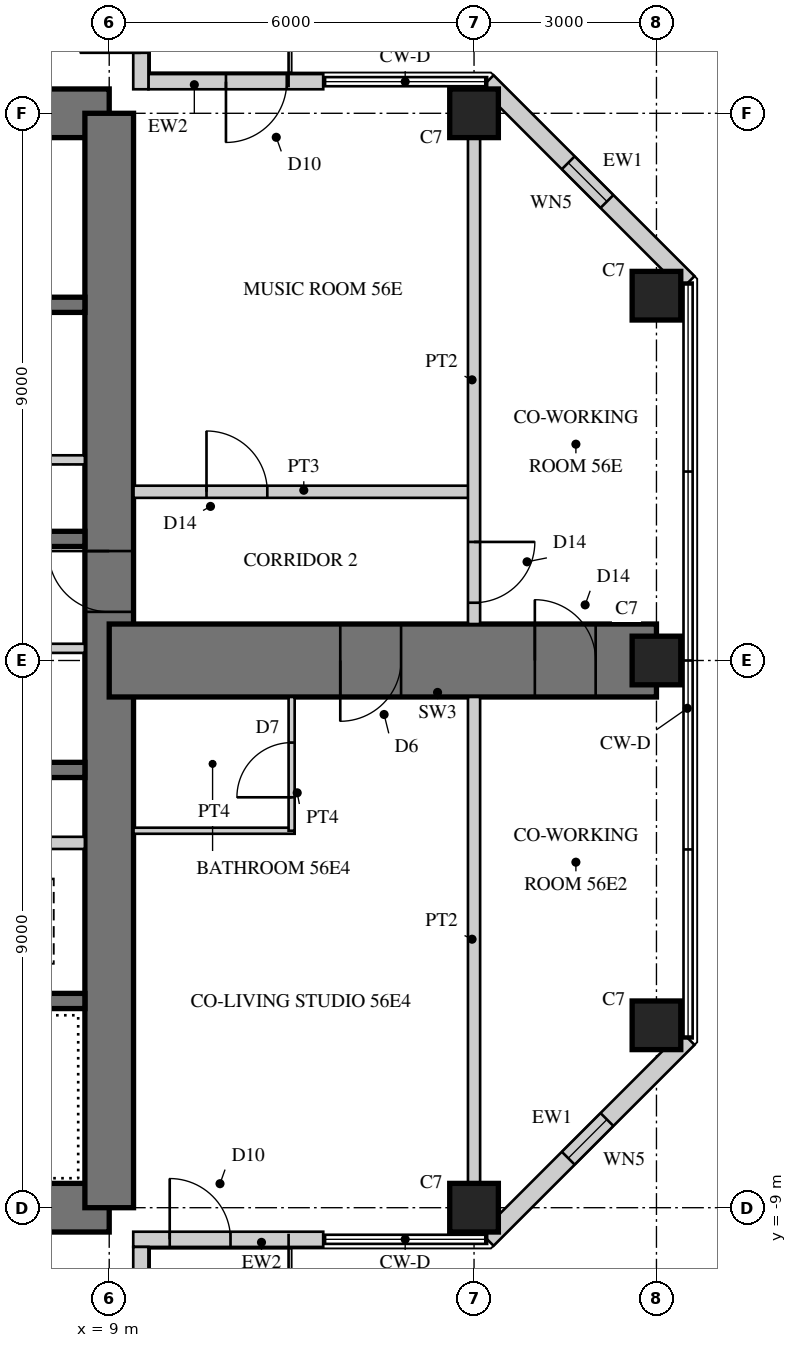
"""IFC4 building model, lengths in metres.
Left out: names, types, materials, properties, quantities, classifications, styles, units other than length and angle.
Written with IfcOpenShell. Run it as: python <this file> out.ifc"""

import sys

from ifc_helpers import new_model, si_unit, direction, frame, frame_2d, origin, origin_2d, place, context, subcontext, project, spatial, rectangle, hollow_rectangle, extrude, element, fill, save


model = new_model("IFC4")
c1 = context("Model", 3, precision=1e-05, world=origin(), true_north=direction((0.0, 1.0)))
c2 = subcontext(c1, "Body", "Model", "MODEL_VIEW")
j1 = project(units=[si_unit("LENGTHUNIT", "METRE"), si_unit("PLANEANGLEUNIT", "RADIAN")], contexts=[c1])
p1 = place(None, origin())
s1 = spatial("IfcSite", under=j1, at=p1, CompositionType="ELEMENT")
p2 = place(p1, origin())
s2 = spatial("IfcBuilding", under=s1, at=p2, CompositionType="ELEMENT")
p3 = place(p2, frame((0.0, 0.0, 222.1)))
s3 = spatial("IfcBuildingStorey", under=s2, at=p3, CompositionType="ELEMENT", Elevation=222.1)
p4 = place(p3, frame((9.0, 9.0, 0.0), z_axis=(0.0, 0.0, 1.0), x_axis=(-1.0, 0.0, 0.0)))
e1 = element("IfcWall", 1, at=p4, inside=s3, PredefinedType="SHEAR", context=c2, shape_type="SweptSolid", body=[
    extrude(rectangle(XDim=18.0, YDim=0.8, at=frame_2d((9.0, 0.0))), origin(), (0.0, 0.0, 1.0), 3.4),
])
p5 = place(p4, frame((9.8, 0.0, 0.0)))
e2 = element("IfcOpeningElement", 2, at=p5, cuts=e1, PredefinedType="OPENING", context=c2, shape_type="SweptSolid", body=[
    extrude(rectangle(XDim=1.0, YDim=2.4, at=frame_2d((0.5, 1.2))), frame((0.0, 0.41, 0.0), z_axis=(0.0, -1.0, 0.0), x_axis=(1.0, 0.0, 0.0)), (0.0, 0.0, 1.0), 0.82),
])
p6 = place(p3, frame((-9.0, -9.0, 0.0), z_axis=(0.0, 0.0, 1.0), x_axis=(1.0, 0.0, 0.0)))
e3 = element("IfcWall", 3, at=p6, inside=s3, PredefinedType="SHEAR", context=c2, shape_type="SweptSolid", body=[
    extrude(rectangle(XDim=18.0, YDim=0.8, at=frame_2d((9.0, 0.0))), origin(), (0.0, 0.0, 1.0), 3.4),
])
p7 = place(p6, frame((9.8, 0.0, 0.0)))
e4 = element("IfcOpeningElement", 4, at=p7, cuts=e3, PredefinedType="OPENING", context=c2, shape_type="SweptSolid", body=[
    extrude(rectangle(XDim=1.0, YDim=2.4, at=frame_2d((0.5, 1.2))), frame((0.0, 0.41, 0.0), z_axis=(0.0, -1.0, 0.0), x_axis=(1.0, 0.0, 0.0)), (0.0, 0.0, 1.0), 0.82),
])
p8 = place(p3, frame((9.0, -9.0, 0.0), z_axis=(0.0, 0.0, 1.0), x_axis=(0.0, 1.0, 0.0)))
e5 = element("IfcWall", 5, at=p8, inside=s3, PredefinedType="SHEAR", context=c2, shape_type="SweptSolid", body=[
    extrude(rectangle(XDim=18.0, YDim=0.8, at=frame_2d((9.0, 0.0))), origin(), (0.0, 0.0, 1.0), 3.4),
])
p9 = place(p8, frame((9.8, 0.0, 0.0)))
e6 = element("IfcOpeningElement", 6, at=p9, cuts=e5, PredefinedType="OPENING", context=c2, shape_type="SweptSolid", body=[
    extrude(rectangle(XDim=1.0, YDim=2.4, at=frame_2d((0.5, 1.2))), frame((0.0, 0.41, 0.0), z_axis=(0.0, -1.0, 0.0), x_axis=(1.0, 0.0, 0.0)), (0.0, 0.0, 1.0), 0.82),
])
p10 = place(p3, frame((1.925, 2.0, 0.0), z_axis=(0.0, 0.0, 1.0), x_axis=(1.0, 0.0, 0.0)))
e7 = element("IfcWall", 7, at=p10, inside=s3, PredefinedType="SHEAR", context=c2, shape_type="SweptSolid", body=[
    extrude(rectangle(XDim=6.675, YDim=0.25, at=frame_2d((3.337, 0.0))), origin(), (0.0, 0.0, 1.0), 3.4),
])
p11 = place(p3, frame((1.925, 5.85, 0.0), z_axis=(0.0, 0.0, 1.0), x_axis=(1.0, 0.0, 0.0)))
e8 = element("IfcWall", 8, at=p11, inside=s3, PredefinedType="SHEAR", context=c2, shape_type="SweptSolid", body=[
    extrude(rectangle(XDim=6.675, YDim=0.25, at=frame_2d((3.337, 0.0))), origin(), (0.0, 0.0, 1.0), 3.4),
])
p12 = place(p11, frame((0.546, 0.0, 0.0)))
e9 = element("IfcOpeningElement", 9, at=p12, cuts=e8, PredefinedType="OPENING", context=c2, shape_type="SweptSolid", body=[
    extrude(rectangle(XDim=1.0, YDim=2.1, at=frame_2d((0.5, 1.05))), frame((0.0, 0.135, 0.0), z_axis=(0.0, -1.0, 0.0), x_axis=(1.0, 0.0, 0.0)), (0.0, 0.0, 1.0), 0.27),
])
p13 = place(p11, frame((2.837, 0.0, 0.0)))
e10 = element("IfcOpeningElement", 10, at=p13, cuts=e8, PredefinedType="OPENING", context=c2, shape_type="SweptSolid", body=[
    extrude(rectangle(XDim=1.0, YDim=2.1, at=frame_2d((0.5, 1.05))), frame((0.0, 0.135, 0.0), z_axis=(0.0, -1.0, 0.0), x_axis=(1.0, 0.0, 0.0)), (0.0, 0.0, 1.0), 0.27),
])
p14 = place(p3, frame((1.925, 3.3, 0.0), z_axis=(0.0, 0.0, 1.0), x_axis=(1.0, 0.0, 0.0)))
e11 = element("IfcWall", 11, at=p14, inside=s3, PredefinedType="PARTITIONING", context=c2, shape_type="SweptSolid", body=[
    extrude(rectangle(XDim=6.675, YDim=0.15, at=frame_2d((3.337, 0.0))), origin(), (0.0, 0.0, 1.0), 3.4),
])
p15 = place(p14, frame((0.075, 0.0, 0.0)))
e12 = element("IfcOpeningElement", 12, at=p15, cuts=e11, PredefinedType="OPENING", context=c2, shape_type="SweptSolid", body=[
    extrude(rectangle(XDim=0.8, YDim=2.1, at=frame_2d((0.4, 1.05))), frame((0.0, 0.085, 0.0), z_axis=(0.0, -1.0, 0.0), x_axis=(1.0, 0.0, 0.0)), (0.0, 0.0, 1.0), 0.17),
])
p16 = place(p14, frame((3.675, 0.0, 0.0)))
e13 = element("IfcOpeningElement", 13, at=p16, cuts=e11, PredefinedType="OPENING", context=c2, shape_type="SweptSolid", body=[
    extrude(rectangle(XDim=0.8, YDim=2.1, at=frame_2d((0.4, 1.05))), frame((0.0, 0.085, 0.0), z_axis=(0.0, -1.0, 0.0), x_axis=(1.0, 0.0, 0.0)), (0.0, 0.0, 1.0), 0.17),
])
p17 = place(p3, frame((2.125, -1.8, 0.0), z_axis=(0.0, 0.0, 1.0), x_axis=(1.0, 0.0, 0.0)))
e14 = element("IfcWall", 14, at=p17, inside=s3, PredefinedType="SHEAR", context=c2, shape_type="SweptSolid", body=[
    extrude(rectangle(XDim=6.475, YDim=0.25, at=frame_2d((3.238, 0.0))), origin(), (0.0, 0.0, 1.0), 3.4),
])
p18 = place(p3, frame((2.125, -5.6, 0.0), z_axis=(0.0, 0.0, 1.0), x_axis=(1.0, 0.0, 0.0)))
e15 = element("IfcWall", 15, at=p18, inside=s3, PredefinedType="SHEAR", context=c2, shape_type="SweptSolid", body=[
    extrude(rectangle(XDim=6.475, YDim=0.25, at=frame_2d((3.238, 0.0))), origin(), (0.0, 0.0, 1.0), 3.4),
])
p19 = place(p18, frame((0.175, 0.0, 0.0)))
e16 = element("IfcOpeningElement", 16, at=p19, cuts=e15, PredefinedType="OPENING", context=c2, shape_type="SweptSolid", body=[
    extrude(rectangle(XDim=1.0, YDim=2.1, at=frame_2d((0.5, 1.05))), frame((0.0, 0.135, 0.0), z_axis=(0.0, -1.0, 0.0), x_axis=(1.0, 0.0, 0.0)), (0.0, 0.0, 1.0), 0.27),
])
p20 = place(p3, frame((5.725, -3.0, 0.0), z_axis=(0.0, 0.0, 1.0), x_axis=(1.0, 0.0, 0.0)))
e17 = element("IfcWall", 17, at=p20, inside=s3, PredefinedType="PARTITIONING", context=c2, shape_type="SweptSolid", body=[
    extrude(rectangle(XDim=2.875, YDim=0.2, at=frame_2d((1.438, 0.0))), origin(), (0.0, 0.0, 1.0), 3.4),
])
p21 = place(p3, frame((9.0, 0.0, 0.0), z_axis=(0.0, 0.0, 1.0), x_axis=(1.0, 0.0, 0.0)))
e18 = element("IfcWall", 18, at=p21, inside=s3, PredefinedType="SHEAR", context=c2, shape_type="SweptSolid", body=[
    extrude(rectangle(XDim=9.0, YDim=1.2, at=frame_2d((4.5, 0.0))), origin(), (0.0, 0.0, 1.0), 3.4),
])
p22 = place(p21, frame((3.8, 0.0, 0.0)))
e19 = element("IfcOpeningElement", 19, at=p22, cuts=e18, PredefinedType="OPENING", context=c2, shape_type="SweptSolid", body=[
    extrude(rectangle(XDim=1.0, YDim=2.15, at=frame_2d((0.5, 1.075))), frame((0.0, 0.61, 0.0), z_axis=(0.0, -1.0, 0.0), x_axis=(1.0, 0.0, 0.0)), (0.0, 0.0, 1.0), 1.22),
])
p23 = place(p21, frame((7.0, 0.0, 0.0)))
e20 = element("IfcOpeningElement", 20, at=p23, cuts=e18, PredefinedType="OPENING", context=c2, shape_type="SweptSolid", body=[
    extrude(rectangle(XDim=1.0, YDim=2.2, at=frame_2d((0.5, 1.1))), frame((0.0, 0.61, 0.0), z_axis=(0.0, -1.0, 0.0), x_axis=(1.0, 0.0, 0.0)), (0.0, 0.0, 1.0), 1.22),
])
for number, where, z_axis, x_axis in (
    (21, (15.0, -9.0, 0.0), (0.0, 0.0, 1.0), (1.0, 0.0, 0.0)),
    (22, (15.0, 9.0, 0.0), (0.0, 0.0, 1.0), (1.0, 0.0, 0.0)),
    (23, (18.0, -6.0, 0.0), (0.0, 0.0, 1.0), (1.0, 0.0, 0.0)),
    (24, (18.0, 0.0, 0.0), (0.0, 0.0, 1.0), (1.0, 0.0, 0.0)),
    (25, (18.0, 6.0, 0.0), (0.0, 0.0, 1.0), (1.0, 0.0, 0.0)),
):
    element("IfcColumn", number, at=place(p3, frame(where, z_axis=z_axis, x_axis=x_axis)), inside=s3, PredefinedType="COLUMN", context=c2, shape_type="SweptSolid", body=[
        extrude(rectangle(XDim=0.8, YDim=0.8, at=origin_2d()), origin(), (0.0, 0.0, 1.0), 3.4),
    ])
p24 = place(p3, frame((9.395, -9.52, 0.0), z_axis=(0.0, 0.0, 1.0), x_axis=(1.0, 0.0, 0.0)))
e26 = element("IfcWall", 26, at=p24, inside=s3, PredefinedType="SOLIDWALL", context=c2, shape_type="SweptSolid", body=[
    extrude(rectangle(XDim=3.125, YDim=0.25, at=frame_2d((1.562, 0.0))), origin(), (0.0, 0.0, 1.0), 3.22),
])
p25 = place(p24, frame((0.6, 0.0, 0.0)))
e27 = element("IfcOpeningElement", 27, at=p25, cuts=e26, PredefinedType="OPENING", context=c2, shape_type="SweptSolid", body=[
    extrude(rectangle(XDim=1.0, YDim=2.2, at=frame_2d((0.5, 1.1))), frame((0.0, 0.135, 0.0), z_axis=(0.0, -1.0, 0.0), x_axis=(1.0, 0.0, 0.0)), (0.0, 0.0, 1.0), 0.27),
])
p26 = place(p3, frame((15.215, -9.52, 0.0), z_axis=(0.0, 0.0, 1.0), x_axis=(0.707106781187, 0.707106781187, 0.0)))
e28 = element("IfcWall", 28, at=p26, inside=s3, PredefinedType="SOLIDWALL", context=c2, shape_type="SweptSolid", body=[
    extrude(rectangle(XDim=4.674, YDim=0.3, at=frame_2d((2.337, 0.0))), origin(), (0.0, 0.0, 1.0), 3.22),
])
p27 = place(p26, frame((1.887, 0.0, 0.3)))
e29 = element("IfcOpeningElement", 29, at=p27, cuts=e28, PredefinedType="OPENING", context=c2, shape_type="SweptSolid", body=[
    extrude(rectangle(XDim=0.9, YDim=2.4, at=frame_2d((0.45, 1.2))), frame((0.0, 0.16, 0.0), z_axis=(0.0, -1.0, 0.0), x_axis=(1.0, 0.0, 0.0)), (0.0, 0.0, 1.0), 0.32),
])
p28 = place(p3, frame((18.52, 6.215, 0.0), z_axis=(0.0, 0.0, 1.0), x_axis=(-0.707106781187, 0.707106781187, 0.0)))
e30 = element("IfcWall", 30, at=p28, inside=s3, PredefinedType="SOLIDWALL", context=c2, shape_type="SweptSolid", body=[
    extrude(rectangle(XDim=4.674, YDim=0.3, at=frame_2d((2.337, 0.0))), origin(), (0.0, 0.0, 1.0), 3.22),
])
p29 = place(p28, frame((1.887, 0.0, 0.3)))
e31 = element("IfcOpeningElement", 31, at=p29, cuts=e30, PredefinedType="OPENING", context=c2, shape_type="SweptSolid", body=[
    extrude(rectangle(XDim=0.9, YDim=2.4, at=frame_2d((0.45, 1.2))), frame((0.0, 0.16, 0.0), z_axis=(0.0, -1.0, 0.0), x_axis=(1.0, 0.0, 0.0)), (0.0, 0.0, 1.0), 0.32),
])
p30 = place(p3, frame((12.52, 9.52, 0.0), z_axis=(0.0, 0.0, 1.0), x_axis=(-1.0, 0.0, 0.0)))
e32 = element("IfcWall", 32, at=p30, inside=s3, PredefinedType="SOLIDWALL", context=c2, shape_type="SweptSolid", body=[
    extrude(rectangle(XDim=2.875, YDim=0.25, at=frame_2d((1.438, 0.0))), origin(), (0.0, 0.0, 1.0), 3.22),
])
p31 = place(p30, frame((0.6, 0.0, 0.0)))
e33 = element("IfcOpeningElement", 33, at=p31, cuts=e32, PredefinedType="OPENING", context=c2, shape_type="SweptSolid", body=[
    extrude(rectangle(XDim=1.0, YDim=2.2, at=frame_2d((0.5, 1.1))), frame((0.0, 0.135, 0.0), z_axis=(0.0, -1.0, 0.0), x_axis=(1.0, 0.0, 0.0)), (0.0, 0.0, 1.0), 0.27),
])
p32 = place(p3, frame((9.52, 9.395, 0.0), z_axis=(0.0, 0.0, 1.0), x_axis=(0.0, 1.0, 0.0)))
e34 = element("IfcWall", 34, at=p32, inside=s3, PredefinedType="SOLIDWALL", context=c2, shape_type="SweptSolid", body=[
    extrude(rectangle(XDim=3.125, YDim=0.25, at=frame_2d((1.562, 0.0))), origin(), (0.0, 0.0, 1.0), 3.22),
])
p33 = place(p32, frame((0.6, 0.0, 0.0)))
e35 = element("IfcOpeningElement", 35, at=p33, cuts=e34, PredefinedType="OPENING", context=c2, shape_type="SweptSolid", body=[
    extrude(rectangle(XDim=1.0, YDim=2.2, at=frame_2d((0.5, 1.1))), frame((0.0, 0.135, 0.0), z_axis=(0.0, -1.0, 0.0), x_axis=(1.0, 0.0, 0.0)), (0.0, 0.0, 1.0), 0.27),
])
p34 = place(p3, frame((9.52, -12.52, 0.0), z_axis=(0.0, 0.0, 1.0), x_axis=(0.0, 1.0, 0.0)))
e36 = element("IfcWall", 36, at=p34, inside=s3, PredefinedType="SOLIDWALL", context=c2, shape_type="SweptSolid", body=[
    extrude(rectangle(XDim=2.875, YDim=0.25, at=frame_2d((1.438, 0.0))), origin(), (0.0, 0.0, 1.0), 3.22),
])
p35 = place(p34, frame((0.6, 0.0, 0.0)))
e37 = element("IfcOpeningElement", 37, at=p35, cuts=e36, PredefinedType="OPENING", context=c2, shape_type="SweptSolid", body=[
    extrude(rectangle(XDim=1.0, YDim=2.2, at=frame_2d((0.5, 1.1))), frame((0.0, 0.135, 0.0), z_axis=(0.0, -1.0, 0.0), x_axis=(1.0, 0.0, 0.0)), (0.0, 0.0, 1.0), 0.27),
])
p36 = place(p3, frame((2.325, 0.2, 0.0), z_axis=(0.0, 0.0, 1.0), x_axis=(1.0, 0.0, 0.0)))
e38 = element("IfcWall", 38, at=p36, inside=s3, PredefinedType="PARTITIONING", context=c2, shape_type="SweptSolid", body=[
    extrude(rectangle(XDim=6.275, YDim=0.15, at=frame_2d((3.138, 0.0))), origin(), (0.0, 0.0, 1.0), 3.22),
])
p37 = place(p36, frame((0.4, 0.0, 0.0)))
e39 = element("IfcOpeningElement", 39, at=p37, cuts=e38, PredefinedType="OPENING", context=c2, shape_type="SweptSolid", body=[
    extrude(rectangle(XDim=1.0, YDim=2.1, at=frame_2d((0.5, 1.05))), frame((0.0, 0.085, 0.0), z_axis=(0.0, -1.0, 0.0), x_axis=(1.0, 0.0, 0.0)), (0.0, 0.0, 1.0), 0.17),
])
p38 = place(p3, frame((9.4, -2.8, 0.0), z_axis=(0.0, 0.0, 1.0), x_axis=(1.0, 0.0, 0.0)))
e40 = element("IfcWall", 40, at=p38, inside=s3, PredefinedType="PARTITIONING", context=c2, shape_type="SweptSolid", body=[
    extrude(rectangle(XDim=2.65, YDim=0.1, at=frame_2d((1.325, 0.0))), origin(), (0.0, 0.0, 1.0), 3.22),
])
p39 = place(p3, frame((12.0, -2.8, 0.0), z_axis=(0.0, 0.0, 1.0), x_axis=(0.0, 1.0, 0.0)))
e41 = element("IfcWall", 41, at=p39, inside=s3, PredefinedType="PARTITIONING", context=c2, shape_type="SweptSolid", body=[
    extrude(rectangle(XDim=2.2, YDim=0.1, at=frame_2d((1.1, 0.0))), origin(), (0.0, 0.0, 1.0), 3.22),
])
p40 = place(p39, frame((0.55, 0.0, 0.0)))
e42 = element("IfcOpeningElement", 42, at=p40, cuts=e41, PredefinedType="OPENING", context=c2, shape_type="SweptSolid", body=[
    extrude(rectangle(XDim=0.9, YDim=2.1, at=frame_2d((0.45, 1.05))), frame((0.0, 0.06, 0.0), z_axis=(0.0, -1.0, 0.0), x_axis=(1.0, 0.0, 0.0)), (0.0, 0.0, 1.0), 0.12),
])
p41 = place(p3, frame((9.4, 2.775, 0.0), z_axis=(0.0, 0.0, 1.0), x_axis=(1.0, 0.0, 0.0)))
e43 = element("IfcWall", 43, at=p41, inside=s3, PredefinedType="SOLIDWALL", context=c2, shape_type="SweptSolid", body=[
    extrude(rectangle(XDim=5.6, YDim=0.2, at=frame_2d((2.8, 0.0))), origin(), (0.0, 0.0, 1.0), 3.22),
])
p42 = place(p41, frame((1.2, 0.0, 0.0)))
e44 = element("IfcOpeningElement", 44, at=p42, cuts=e43, PredefinedType="OPENING", context=c2, shape_type="SweptSolid", body=[
    extrude(rectangle(XDim=1.0, YDim=2.2, at=frame_2d((0.5, 1.1))), frame((0.0, 0.11, 0.0), z_axis=(0.0, -1.0, 0.0), x_axis=(1.0, 0.0, 0.0)), (0.0, 0.0, 1.0), 0.22),
])
p43 = place(p3, frame((15.0, -8.6, 0.0), z_axis=(0.0, 0.0, 1.0), x_axis=(0.0, 1.0, 0.0)))
e45 = element("IfcWall", 45, at=p43, inside=s3, PredefinedType="SOLIDWALL", context=c2, shape_type="SweptSolid", body=[
    extrude(rectangle(XDim=8.0, YDim=0.2, at=frame_2d((4.0, 0.0))), origin(), (0.0, 0.0, 1.0), 2.52),
])
p44 = place(p3, frame((15.0, 0.6, 0.0), z_axis=(0.0, 0.0, 1.0), x_axis=(0.0, 1.0, 0.0)))
e46 = element("IfcWall", 46, at=p44, inside=s3, PredefinedType="SOLIDWALL", context=c2, shape_type="SweptSolid", body=[
    extrude(rectangle(XDim=8.0, YDim=0.2, at=frame_2d((4.0, 0.0))), origin(), (0.0, 0.0, 1.0), 2.52),
])
p45 = place(p44, frame((0.35, 0.0, 0.0)))
e47 = element("IfcOpeningElement", 47, at=p45, cuts=e46, PredefinedType="OPENING", context=c2, shape_type="SweptSolid", body=[
    extrude(rectangle(XDim=1.0, YDim=2.2, at=frame_2d((0.5, 1.1))), frame((0.0, 0.11, 0.0), z_axis=(0.0, -1.0, 0.0), x_axis=(1.0, 0.0, 0.0)), (0.0, 0.0, 1.0), 0.22),
])
p46 = place(p25, origin())
e48 = element("IfcDoor", 48, at=p46, inside=s3, OperationType="SINGLE_SWING_LEFT", PredefinedType="DOOR", context=c2, shape_type="SweptSolid", body=[
    extrude(hollow_rectangle(XDim=1.0, YDim=2.2, WallThickness=0.06, at=frame_2d((0.5, 1.1))), frame((0.0, 0.025, 0.0), z_axis=(0.0, -1.0, 0.0), x_axis=(1.0, 0.0, 0.0)), (0.0, 0.0, 1.0), 0.05),
    extrude(rectangle(XDim=0.879, YDim=2.079, at=frame_2d((0.5, 1.1))), frame((0.0, 0.025, 0.0), z_axis=(0.0, -1.0, 0.0), x_axis=(1.0, 0.0, 0.0)), (0.0, 0.0, 1.0), 0.05),
])
fill(e27, e48)
p47 = place(p27, origin())
e49 = element("IfcWindow", 49, at=p47, inside=s3, PartitioningType="SINGLE_PANEL", PredefinedType="WINDOW", context=c2, shape_type="SweptSolid", body=[
    extrude(hollow_rectangle(XDim=0.9, YDim=2.4, WallThickness=0.06, at=frame_2d((0.45, 1.2))), frame((0.0, 0.03, 0.0), z_axis=(0.0, -1.0, 0.0), x_axis=(1.0, 0.0, 0.0)), (0.0, 0.0, 1.0), 0.06),
    extrude(rectangle(XDim=0.779, YDim=2.279, at=frame_2d((0.45, 1.2))), frame((0.0, 0.03, 0.0), z_axis=(0.0, -1.0, 0.0), x_axis=(1.0, 0.0, 0.0)), (0.0, 0.0, 1.0), 0.06),
])
fill(e29, e49)
p48 = place(p29, origin())
e50 = element("IfcWindow", 50, at=p48, inside=s3, PartitioningType="SINGLE_PANEL", PredefinedType="WINDOW", context=c2, shape_type="SweptSolid", body=[
    extrude(hollow_rectangle(XDim=0.9, YDim=2.4, WallThickness=0.06, at=frame_2d((0.45, 1.2))), frame((0.0, 0.03, 0.0), z_axis=(0.0, -1.0, 0.0), x_axis=(1.0, 0.0, 0.0)), (0.0, 0.0, 1.0), 0.06),
    extrude(rectangle(XDim=0.779, YDim=2.279, at=frame_2d((0.45, 1.2))), frame((0.0, 0.03, 0.0), z_axis=(0.0, -1.0, 0.0), x_axis=(1.0, 0.0, 0.0)), (0.0, 0.0, 1.0), 0.06),
])
fill(e31, e50)
p49 = place(p31, origin())
e51 = element("IfcDoor", 51, at=p49, inside=s3, OperationType="SINGLE_SWING_RIGHT", PredefinedType="DOOR", context=c2, shape_type="SweptSolid", body=[
    extrude(hollow_rectangle(XDim=1.0, YDim=2.2, WallThickness=0.06, at=frame_2d((0.5, 1.1))), frame((0.0, 0.025, 0.0), z_axis=(0.0, -1.0, 0.0), x_axis=(1.0, 0.0, 0.0)), (0.0, 0.0, 1.0), 0.05),
    extrude(rectangle(XDim=0.879, YDim=2.079, at=frame_2d((0.5, 1.1))), frame((0.0, 0.025, 0.0), z_axis=(0.0, -1.0, 0.0), x_axis=(1.0, 0.0, 0.0)), (0.0, 0.0, 1.0), 0.05),
])
fill(e33, e51)
p50 = place(p33, origin())
e52 = element("IfcDoor", 52, at=p50, inside=s3, OperationType="SINGLE_SWING_LEFT", PredefinedType="DOOR", context=c2, shape_type="SweptSolid", body=[
    extrude(hollow_rectangle(XDim=1.0, YDim=2.2, WallThickness=0.06, at=frame_2d((0.5, 1.1))), frame((0.0, 0.025, 0.0), z_axis=(0.0, -1.0, 0.0), x_axis=(1.0, 0.0, 0.0)), (0.0, 0.0, 1.0), 0.05),
    extrude(rectangle(XDim=0.879, YDim=2.079, at=frame_2d((0.5, 1.1))), frame((0.0, 0.025, 0.0), z_axis=(0.0, -1.0, 0.0), x_axis=(1.0, 0.0, 0.0)), (0.0, 0.0, 1.0), 0.05),
])
fill(e35, e52)
p51 = place(p40, origin())
e53 = element("IfcDoor", 53, at=p51, inside=s3, OperationType="SINGLE_SWING_LEFT", PredefinedType="DOOR", context=c2, shape_type="SweptSolid", body=[
    extrude(rectangle(XDim=0.9, YDim=2.1, at=frame_2d((0.45, 1.05))), frame((0.0, 0.025, 0.0), z_axis=(0.0, -1.0, 0.0), x_axis=(1.0, 0.0, 0.0)), (0.0, 0.0, 1.0), 0.05),
])
fill(e42, e53)
p52 = place(p42, origin())
e54 = element("IfcDoor", 54, at=p52, inside=s3, OperationType="SINGLE_SWING_LEFT", PredefinedType="DOOR", context=c2, shape_type="SweptSolid", body=[
    extrude(rectangle(XDim=1.0, YDim=2.2, at=frame_2d((0.5, 1.1))), frame((0.0, 0.025, 0.0), z_axis=(0.0, -1.0, 0.0), x_axis=(1.0, 0.0, 0.0)), (0.0, 0.0, 1.0), 0.05),
])
fill(e44, e54)
p53 = place(p45, frame((1.0, 0.0, 0.0), z_axis=(0.0, 0.0, 1.0), x_axis=(-1.0, 0.0, 0.0)))
e55 = element("IfcDoor", 55, at=p53, inside=s3, OperationType="SINGLE_SWING_LEFT", PredefinedType="DOOR", context=c2, shape_type="SweptSolid", body=[
    extrude(rectangle(XDim=1.0, YDim=2.2, at=frame_2d((0.5, 1.1))), frame((0.0, 0.025, 0.0), z_axis=(0.0, -1.0, 0.0), x_axis=(1.0, 0.0, 0.0)), (0.0, 0.0, 1.0), 0.05),
])
fill(e47, e55)
p54 = place(p22, frame((1.0, 0.0, 0.0), z_axis=(0.0, 0.0, 1.0), x_axis=(-1.0, 0.0, 0.0)))
e56 = element("IfcDoor", 56, at=p54, inside=s3, OperationType="SINGLE_SWING_RIGHT", PredefinedType="DOOR", context=c2, shape_type="SweptSolid", body=[
    extrude(rectangle(XDim=1.0, YDim=2.15, at=frame_2d((0.5, 1.075))), frame((0.0, 0.025, 0.0), z_axis=(0.0, -1.0, 0.0), x_axis=(1.0, 0.0, 0.0)), (0.0, 0.0, 1.0), 0.05),
])
fill(e19, e56)
p55 = place(p23, origin())
e57 = element("IfcDoor", 57, at=p55, inside=s3, OperationType="SINGLE_SWING_LEFT", PredefinedType="DOOR", context=c2, shape_type="SweptSolid", body=[
    extrude(rectangle(XDim=1.0, YDim=2.2, at=frame_2d((0.5, 1.1))), frame((0.0, 0.025, 0.0), z_axis=(0.0, -1.0, 0.0), x_axis=(1.0, 0.0, 0.0)), (0.0, 0.0, 1.0), 0.05),
])
fill(e20, e57)
p56 = place(p9, origin())
e58 = element("IfcDoor", 58, at=p56, inside=s3, OperationType="SINGLE_SWING_RIGHT", PredefinedType="DOOR", context=c2, shape_type="SweptSolid", body=[
    extrude(rectangle(XDim=1.0, YDim=2.4, at=frame_2d((0.5, 1.2))), frame((0.0, 0.055, 0.0), z_axis=(0.0, -1.0, 0.0), x_axis=(1.0, 0.0, 0.0)), (0.0, 0.0, 1.0), 0.05),
])
fill(e6, e58)
save(model, sys.argv[1])
